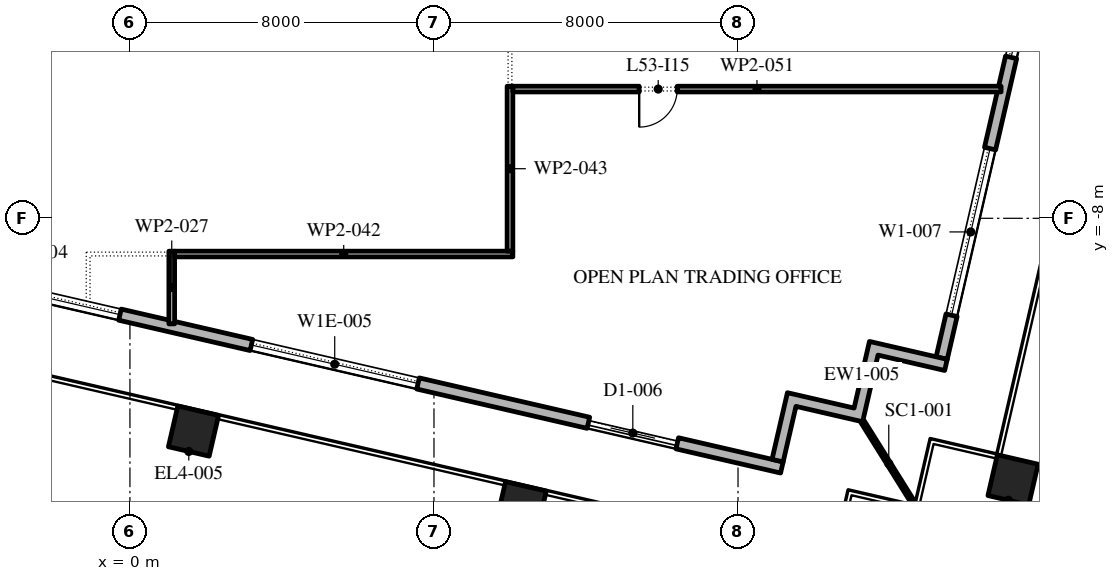
"""IFC4 building model, lengths in metres.
Left out: names, types, materials, properties, quantities, classifications, styles, units other than length and angle.
Written with IfcOpenShell. Run it as: python <this file> out.ifc"""

import sys

from ifc_helpers import new_model, si_unit, direction, frame, frame_2d, origin, origin_2d, place, context, subcontext, project, spatial, polyline, rectangle, outline, extrude, element, fill, save


model = new_model("IFC4")
c1 = context("Model", 3, precision=1e-05, world=origin(), true_north=direction((0.0, 1.0)))
c2 = subcontext(c1, "Body", "Model", "MODEL_VIEW")
j1 = project(units=[si_unit("LENGTHUNIT", "METRE"), si_unit("PLANEANGLEUNIT", "RADIAN")], contexts=[c1])
p1 = place(None, origin())
s1 = spatial("IfcSite", under=j1, at=p1, CompositionType="ELEMENT")
p2 = place(p1, origin())
s2 = spatial("IfcBuilding", under=s1, at=p2, CompositionType="ELEMENT")
p3 = place(p2, frame((0.0, 0.0, 247.2)))
s3 = spatial("IfcBuildingStorey", under=s2, at=p3, CompositionType="ELEMENT", Elevation=247.2)
for number, where, z_axis, x_axis in (
    (1, (1.672, -13.599, 0.0), (0.0, 0.0, 1.0), (0.974, -0.225, 0.0)),
    (2, (10.295, -15.59, 0.0), (0.0, 0.0, 1.0), (0.974, -0.225, 0.0)),
    (3, (23.236, -14.883, 0.0), (0.0, 0.0, 1.0), (0.974, -0.225, 0.0)),
):
    element("IfcColumn", number, at=place(p3, frame(where, z_axis=z_axis, x_axis=x_axis)), inside=s3, PredefinedType="COLUMN", context=c2, shape_type="SweptSolid", body=[
        extrude(rectangle(XDim=1.1, YDim=1.1, at=origin_2d()), origin(), (0.0, 0.0, 1.0), 4.2),
    ])
p4 = place(p3, frame((-29.616, -3.758, 0.0), z_axis=(0.0, 0.0, 1.0), x_axis=(0.974370532314, -0.224949029246, 0.0)))
e4 = element("IfcWall", 4, at=p4, inside=s3, PredefinedType="STANDARD", context=c2, shape_type="SweptSolid", body=[
    extrude(rectangle(XDim=48.0, YDim=0.3, at=frame_2d((24.0, 0.0))), origin(), (0.0, 0.0, 1.0), 4.0),
])
p5 = place(p4, frame((1.625, 0.0, 0.45)))
e5 = element("IfcOpeningElement", 5, at=p5, cuts=e4, PredefinedType="OPENING", context=c2, shape_type="SweptSolid", body=[
    extrude(rectangle(XDim=4.5, YDim=3.05, at=frame_2d((2.25, 1.525))), frame((0.0, 0.16, 0.0), z_axis=(0.0, -1.0, 0.0), x_axis=(1.0, 0.0, 0.0)), (0.0, 0.0, 1.0), 0.32),
])
p6 = place(p4, frame((10.575, 0.0, 0.0)))
e6 = element("IfcOpeningElement", 6, at=p6, cuts=e4, PredefinedType="OPENING", context=c2, shape_type="SweptSolid", body=[
    extrude(rectangle(XDim=2.4, YDim=3.5, at=frame_2d((1.2, 1.75))), frame((0.0, 0.16, 0.0), z_axis=(0.0, -1.0, 0.0), x_axis=(1.0, 0.0, 0.0)), (0.0, 0.0, 1.0), 0.32),
])
p7 = place(p4, frame((17.575, 0.0, 0.45)))
e7 = element("IfcOpeningElement", 7, at=p7, cuts=e4, PredefinedType="OPENING", context=c2, shape_type="SweptSolid", body=[
    extrude(rectangle(XDim=4.5, YDim=3.0, at=frame_2d((2.25, 1.5))), frame((0.0, 0.16, 0.0), z_axis=(0.0, -1.0, 0.0), x_axis=(1.0, 0.0, 0.0)), (0.0, 0.0, 1.0), 0.32),
])
p8 = place(p4, frame((25.625, 0.0, 0.45)))
e8 = element("IfcOpeningElement", 8, at=p8, cuts=e4, PredefinedType="OPENING", context=c2, shape_type="SweptSolid", body=[
    extrude(rectangle(XDim=4.5, YDim=3.05, at=frame_2d((2.25, 1.525))), frame((0.0, 0.16, 0.0), z_axis=(0.0, -1.0, 0.0), x_axis=(1.0, 0.0, 0.0)), (0.0, 0.0, 1.0), 0.32),
])
p9 = place(p4, frame((33.675, 0.0, 0.45)))
e9 = element("IfcOpeningElement", 9, at=p9, cuts=e4, PredefinedType="OPENING", context=c2, shape_type="SweptSolid", body=[
    extrude(rectangle(XDim=4.5, YDim=2.825, at=frame_2d((2.25, 1.413))), frame((0.0, 0.16, 0.0), z_axis=(0.0, -1.0, 0.0), x_axis=(1.0, 0.0, 0.0)), (0.0, 0.0, 1.0), 0.32),
])
p10 = place(p4, frame((42.775, 0.0, 0.0)))
e10 = element("IfcOpeningElement", 10, at=p10, cuts=e4, PredefinedType="OPENING", context=c2, shape_type="SweptSolid", body=[
    extrude(rectangle(XDim=2.4, YDim=3.5, at=frame_2d((1.2, 1.75))), frame((0.0, 0.16, 0.0), z_axis=(0.0, -1.0, 0.0), x_axis=(1.0, 0.0, 0.0)), (0.0, 0.0, 1.0), 0.32),
])
p11 = place(p3, frame((21.359, -11.678, 0.0), z_axis=(0.0, 0.0, 1.0), x_axis=(0.224949198343, 0.974370493275, 0.0)))
e11 = element("IfcWall", 11, at=p11, inside=s3, PredefinedType="STANDARD", context=c2, shape_type="SweptSolid", body=[
    extrude(rectangle(XDim=49.5, YDim=0.3, at=frame_2d((24.75, 0.0))), origin(), (0.0, 0.0, 1.0), 4.0),
])
p12 = place(p11, frame((1.157, 0.0, 0.45)))
e12 = element("IfcOpeningElement", 12, at=p12, cuts=e11, PredefinedType="OPENING", context=c2, shape_type="SweptSolid", body=[
    extrude(rectangle(XDim=4.5, YDim=3.05, at=frame_2d((2.25, 1.525))), frame((0.0, 0.16, 0.0), z_axis=(0.0, -1.0, 0.0), x_axis=(1.0, 0.0, 0.0)), (0.0, 0.0, 1.0), 0.32),
])
p13 = place(p11, frame((8.121, 0.0, 0.45)))
e13 = element("IfcOpeningElement", 13, at=p13, cuts=e11, PredefinedType="OPENING", context=c2, shape_type="SweptSolid", body=[
    extrude(rectangle(XDim=4.5, YDim=3.05, at=frame_2d((2.25, 1.525))), frame((0.0, 0.16, 0.0), z_axis=(0.0, -1.0, 0.0), x_axis=(1.0, 0.0, 0.0)), (0.0, 0.0, 1.0), 0.32),
])
p14 = place(p11, frame((15.236, 0.0, 0.45)))
e14 = element("IfcOpeningElement", 14, at=p14, cuts=e11, PredefinedType="OPENING", context=c2, shape_type="SweptSolid", body=[
    extrude(rectangle(XDim=4.5, YDim=3.05, at=frame_2d((2.25, 1.525))), frame((0.0, 0.16, 0.0), z_axis=(0.0, -1.0, 0.0), x_axis=(1.0, 0.0, 0.0)), (0.0, 0.0, 1.0), 0.32),
])
p15 = place(p11, frame((22.35, 0.0, 0.45)))
e15 = element("IfcOpeningElement", 15, at=p15, cuts=e11, PredefinedType="OPENING", context=c2, shape_type="SweptSolid", body=[
    extrude(rectangle(XDim=4.5, YDim=3.05, at=frame_2d((2.25, 1.525))), frame((0.0, 0.16, 0.0), z_axis=(0.0, -1.0, 0.0), x_axis=(1.0, 0.0, 0.0)), (0.0, 0.0, 1.0), 0.32),
])
p16 = place(p11, frame((29.464, 0.0, 0.45)))
e16 = element("IfcOpeningElement", 16, at=p16, cuts=e11, PredefinedType="OPENING", context=c2, shape_type="SweptSolid", body=[
    extrude(rectangle(XDim=4.5, YDim=2.95, at=frame_2d((2.25, 1.475))), frame((0.0, 0.16, 0.0), z_axis=(0.0, -1.0, 0.0), x_axis=(1.0, 0.0, 0.0)), (0.0, 0.0, 1.0), 0.32),
])
p17 = place(p11, frame((37.628, 0.0, 0.0)))
e17 = element("IfcOpeningElement", 17, at=p17, cuts=e11, PredefinedType="OPENING", context=c2, shape_type="SweptSolid", body=[
    extrude(rectangle(XDim=2.4, YDim=3.325, at=frame_2d((1.2, 1.663))), frame((0.0, 0.16, 0.0), z_axis=(0.0, -1.0, 0.0), x_axis=(1.0, 0.0, 0.0)), (0.0, 0.0, 1.0), 0.32),
])
p18 = place(p11, frame((43.693, 0.0, 0.45)))
e18 = element("IfcOpeningElement", 18, at=p18, cuts=e11, PredefinedType="OPENING", context=c2, shape_type="SweptSolid", body=[
    extrude(rectangle(XDim=4.5, YDim=3.05, at=frame_2d((2.25, 1.525))), frame((0.0, 0.16, 0.0), z_axis=(0.0, -1.0, 0.0), x_axis=(1.0, 0.0, 0.0)), (0.0, 0.0, 1.0), 0.32),
])
p19 = place(p3, origin())
e19 = element("IfcWall", 19, at=p19, inside=s3, PredefinedType="STANDARD", context=c2, shape_type="SweptSolid", body=[
    extrude(outline(polyline([(19.054, -12.993), (19.459, -11.24), (21.505, -11.712), (21.438, -12.004), (19.684, -11.599), (19.279, -13.353), (17.525, -12.948), (17.188, -14.41), (16.895, -14.342), (17.3, -12.588), (19.054, -12.993)])), origin(), (0.0, 0.0, 1.0), 4.0),
])
p20 = place(p3, frame((19.279, -13.353, -0.05), z_axis=(0.0, 0.0, 1.0), x_axis=(0.529914407191, -0.848051131154, 0.0)))
e20 = element("IfcWall", 20, at=p20, inside=s3, PredefinedType="STANDARD", context=c2, shape_type="SweptSolid", body=[
    extrude(rectangle(XDim=2.596, YDim=0.1, at=frame_2d((1.298, 0.0))), origin(), (0.0, 0.0, 1.0), 4.05),
])
p21 = place(p3, frame((1.1, -8.865, 0.0), z_axis=(0.0, 0.0, 1.0), x_axis=(0.0, -1.0, 0.0)))
e21 = element("IfcWall", 21, at=p21, inside=s3, PredefinedType="PARTITIONING", context=c2, shape_type="SweptSolid", body=[
    extrude(rectangle(XDim=1.913, YDim=0.15, at=frame_2d((0.957, 0.0))), origin(), (0.0, 0.0, 1.0), 4.0),
])
p22 = place(p3, frame((10.075, -8.94, 0.0), z_axis=(0.0, 0.0, 1.0), x_axis=(-1.0, 0.0, 0.0)))
e22 = element("IfcWall", 22, at=p22, inside=s3, PredefinedType="PARTITIONING", context=c2, shape_type="SweptSolid", body=[
    extrude(rectangle(XDim=8.9, YDim=0.15, at=frame_2d((4.45, 0.0))), origin(), (0.0, 0.0, 1.0), 4.0),
])
p23 = place(p3, frame((10.0, -4.525, 0.0), z_axis=(0.0, 0.0, 1.0), x_axis=(0.0, -1.0, 0.0)))
e23 = element("IfcWall", 23, at=p23, inside=s3, PredefinedType="PARTITIONING", context=c2, shape_type="SweptSolid", body=[
    extrude(rectangle(XDim=4.34, YDim=0.15, at=frame_2d((2.17, 0.0))), origin(), (0.0, 0.0, 1.0), 4.0),
])
p24 = place(p3, frame((22.922, -4.6, 0.0), z_axis=(0.0, 0.0, 1.0), x_axis=(-1.0, 0.0, 0.0)))
e24 = element("IfcWall", 24, at=p24, inside=s3, PredefinedType="PARTITIONING", context=c2, shape_type="SweptSolid", body=[
    extrude(rectangle(XDim=12.847, YDim=0.15, at=frame_2d((6.424, 0.0))), origin(), (0.0, 0.0, 1.0), 4.0),
])
p25 = place(p24, frame((8.522, 0.0, 0.0)))
e25 = element("IfcOpeningElement", 25, at=p25, cuts=e24, PredefinedType="OPENING", context=c2, shape_type="SweptSolid", body=[
    extrude(rectangle(XDim=1.0, YDim=2.1, at=frame_2d((0.5, 1.05))), frame((0.0, 0.085, 0.0), z_axis=(0.0, -1.0, 0.0), x_axis=(1.0, 0.0, 0.0)), (0.0, 0.0, 1.0), 0.17),
])
p26 = place(p8, origin())
e26 = element("IfcWindow", 26, at=p26, inside=s3, PartitioningType="DOUBLE_PANEL_VERTICAL", PredefinedType="WINDOW", context=c2, shape_type="SweptSolid", body=[
    extrude(rectangle(XDim=4.5, YDim=3.05, at=frame_2d((2.25, 1.525))), frame((0.0, 0.03, 0.0), z_axis=(0.0, -1.0, 0.0), x_axis=(1.0, 0.0, 0.0)), (0.0, 0.0, 1.0), 0.06),
])
fill(e8, e26)
p27 = place(p9, origin())
e27 = element("IfcWindow", 27, at=p27, inside=s3, PartitioningType="DOUBLE_PANEL_VERTICAL", PredefinedType="WINDOW", context=c2, shape_type="SweptSolid", body=[
    extrude(rectangle(XDim=4.5, YDim=2.825, at=frame_2d((2.25, 1.413))), frame((0.0, 0.03, 0.0), z_axis=(0.0, -1.0, 0.0), x_axis=(1.0, 0.0, 0.0)), (0.0, 0.0, 1.0), 0.06),
])
fill(e9, e27)
p28 = place(p10, origin())
e28 = element("IfcDoor", 28, at=p28, inside=s3, OperationType="DOUBLE_DOOR_SLIDING", PredefinedType="DOOR", context=c2, shape_type="SweptSolid", body=[
    extrude(rectangle(XDim=2.4, YDim=3.5, at=frame_2d((1.2, 1.75))), frame((0.0, 0.025, 0.0), z_axis=(0.0, -1.0, 0.0), x_axis=(1.0, 0.0, 0.0)), (0.0, 0.0, 1.0), 0.05),
])
fill(e10, e28)
p29 = place(p12, origin())
e29 = element("IfcWindow", 29, at=p29, inside=s3, PartitioningType="DOUBLE_PANEL_VERTICAL", PredefinedType="WINDOW", context=c2, shape_type="SweptSolid", body=[
    extrude(rectangle(XDim=4.5, YDim=3.05, at=frame_2d((2.25, 1.525))), frame((0.0, 0.03, 0.0), z_axis=(0.0, -1.0, 0.0), x_axis=(1.0, 0.0, 0.0)), (0.0, 0.0, 1.0), 0.06),
])
fill(e12, e29)
p30 = place(p13, origin())
e30 = element("IfcWindow", 30, at=p30, inside=s3, PartitioningType="DOUBLE_PANEL_VERTICAL", PredefinedType="WINDOW", context=c2, shape_type="SweptSolid", body=[
    extrude(rectangle(XDim=4.5, YDim=3.05, at=frame_2d((2.25, 1.525))), frame((0.0, 0.03, 0.0), z_axis=(0.0, -1.0, 0.0), x_axis=(1.0, 0.0, 0.0)), (0.0, 0.0, 1.0), 0.06),
])
fill(e13, e30)
p31 = place(p25, origin())
e31 = element("IfcDoor", 31, at=p31, inside=s3, OperationType="SINGLE_SWING_LEFT", PredefinedType="DOOR", context=c2, shape_type="SweptSolid", body=[
    extrude(rectangle(XDim=1.0, YDim=2.1, at=frame_2d((0.5, 1.05))), frame((0.0, 0.025, 0.0), z_axis=(0.0, -1.0, 0.0), x_axis=(1.0, 0.0, 0.0)), (0.0, 0.0, 1.0), 0.05),
])
fill(e25, e31)
save(model, sys.argv[1])
